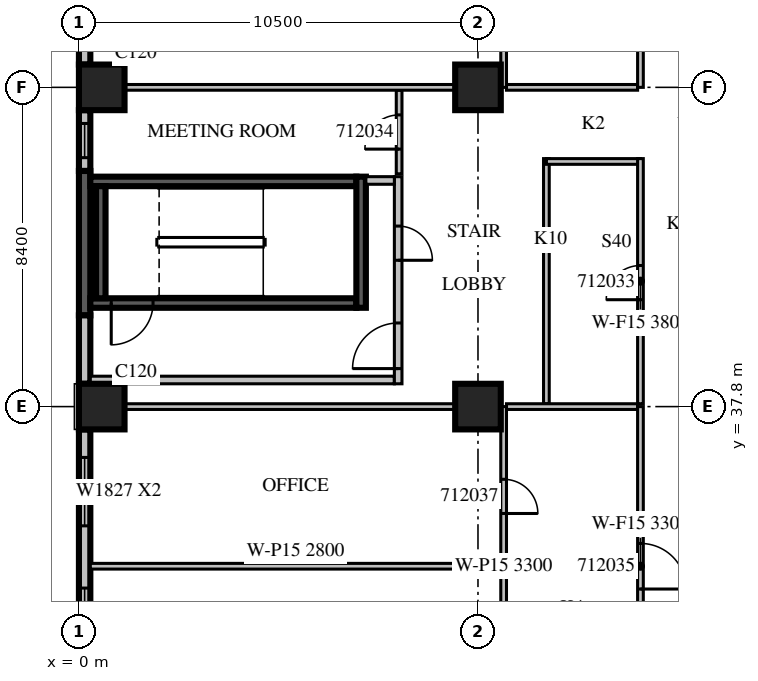
"""IFC4 building model, lengths in metres.
Left out: names, types, materials, properties, quantities, classifications, styles, units other than length and angle.
Written with IfcOpenShell. Run it as: python <this file> out.ifc"""

import sys

from ifc_helpers import new_model, si_unit, direction, frame, frame_2d, origin, origin_2d, place, context, subcontext, project, spatial, rectangle, extrude, source, transform, mapped, element, fill, save


model = new_model("IFC4")
c1 = context("Model", 3, precision=1e-05, world=origin(), true_north=direction((0.0, 1.0)))
c2 = subcontext(c1, "Body", "Model", "MODEL_VIEW")
j1 = project(units=[si_unit("LENGTHUNIT", "METRE"), si_unit("PLANEANGLEUNIT", "RADIAN")], contexts=[c1])
p1 = place(None, origin())
s1 = spatial("IfcSite", under=j1, at=p1, CompositionType="ELEMENT")
p2 = place(p1, origin())
s2 = spatial("IfcBuilding", under=s1, at=p2, CompositionType="ELEMENT")
p3 = place(p2, frame((0.0, 0.0, 61.5)))
s3 = spatial("IfcBuildingStorey", under=s2, at=p3, CompositionType="ELEMENT", Elevation=61.5)
m1 = source(origin(), c2, "Body", "SweptSolid", [
    extrude(rectangle(XDim=1.2, YDim=1.2, at=origin_2d()), origin(), (0.0, 0.0, 1.0), 4.2),
])
for number, where, z_axis, x_axis in (
    (1, (0.6, 37.8, 0.0), (0.0, 0.0, 1.0), (1.0, 0.0, 0.0)),
    (2, (10.5, 37.8, 0.0), (0.0, 0.0, 1.0), (1.0, 0.0, 0.0)),
    (3, (0.6, 46.2, 0.0), (0.0, 0.0, 1.0), (1.0, 0.0, 0.0)),
    (4, (10.5, 46.2, 0.0), (0.0, 0.0, 1.0), (1.0, 0.0, 0.0)),
):
    element("IfcColumn", number, at=place(p3, frame(where, z_axis=z_axis, x_axis=x_axis)), inside=s3, PredefinedType="COLUMN", context=c2, shape_type="MappedRepresentation", body=[
        mapped(m1, transform((0.0, 0.0, 0.0), scale=1.0)),
    ])
m2 = source(origin(), c2, "Body", "SweptSolid", [
    extrude(rectangle(XDim=4.68, YDim=0.3, at=frame_2d((2.34, 0.0))), origin(), (0.0, 0.0, 1.0), 3.8),
])
p4 = place(p3, frame((0.15, 51.48, 0.0), z_axis=(0.0, 0.0, 1.0), x_axis=(0.0, -1.0, 0.0)))
e5 = element("IfcWall", 5, at=p4, inside=s3, PredefinedType="STANDARD", context=c2, shape_type="MappedRepresentation", body=[
    mapped(m2, transform((0.0, 0.0, 0.0), scale=1.0)),
])
m3 = source(origin(), c2, "Body", "SweptSolid", [
    extrude(rectangle(XDim=1.6, YDim=0.3, at=frame_2d((0.8, 0.0))), origin(), (0.0, 0.0, 1.0), 3.8),
])
p5 = place(p3, frame((0.15, 45.6, 0.0), z_axis=(0.0, 0.0, 1.0), x_axis=(0.0, -1.0, 0.0)))
e6 = element("IfcWall", 6, at=p5, inside=s3, PredefinedType="STANDARD", context=c2, shape_type="MappedRepresentation", body=[
    mapped(m3, transform((0.0, 0.0, 0.0), scale=1.0)),
])
m4 = source(origin(), c2, "Body", "SweptSolid", [
    extrude(rectangle(XDim=0.9, YDim=2.7, at=frame_2d((0.45, 1.35))), frame((0.0, 0.16, 0.0), z_axis=(0.0, -1.0, 0.0), x_axis=(1.0, 0.0, 0.0)), (0.0, 0.0, 1.0), 0.32),
])
p6 = place(p5, frame((0.35, 0.0, 0.6)))
e7 = element("IfcOpeningElement", 7, at=p6, cuts=e6, PredefinedType="OPENING", context=c2, shape_type="MappedRepresentation", body=[
    mapped(m4, transform((0.0, 0.0, 0.0), scale=1.0)),
])
m5 = source(origin(), c2, "Body", "SweptSolid", [
    extrude(rectangle(XDim=3.8, YDim=0.3, at=frame_2d((1.9, 0.0))), origin(), (0.0, 0.0, 1.0), 3.8),
])
p7 = place(p3, frame((0.15, 44.0, 0.0), z_axis=(0.0, 0.0, 1.0), x_axis=(0.0, -1.0, 0.0)))
e8 = element("IfcWall", 8, at=p7, inside=s3, PredefinedType="SOLIDWALL", context=c2, shape_type="MappedRepresentation", body=[
    mapped(m5, transform((0.0, 0.0, 0.0), scale=1.0)),
])
m6 = source(origin(), c2, "Body", "SweptSolid", [
    extrude(rectangle(XDim=1.8, YDim=0.3, at=frame_2d((0.9, 0.0))), origin(), (0.0, 0.0, 1.0), 3.8),
])
p8 = place(p3, frame((0.15, 40.2, 0.0), z_axis=(0.0, 0.0, 1.0), x_axis=(0.0, -1.0, 0.0)))
e9 = element("IfcWall", 9, at=p8, inside=s3, PredefinedType="STANDARD", context=c2, shape_type="MappedRepresentation", body=[
    mapped(m6, transform((0.0, 0.0, 0.0), scale=1.0)),
])
m7 = source(origin(), c2, "Body", "SweptSolid", [
    extrude(rectangle(XDim=7.2, YDim=0.3, at=frame_2d((3.6, 0.0))), origin(), (0.0, 0.0, 1.0), 3.8),
])
p9 = place(p3, frame((0.15, 37.2, 0.0), z_axis=(0.0, 0.0, 1.0), x_axis=(0.0, -1.0, 0.0)))
e10 = element("IfcWall", 10, at=p9, inside=s3, PredefinedType="STANDARD", context=c2, shape_type="MappedRepresentation", body=[
    mapped(m7, transform((0.0, 0.0, 0.0), scale=1.0)),
])
m8 = source(origin(), c2, "Body", "SweptSolid", [
    extrude(rectangle(XDim=1.8, YDim=2.7, at=frame_2d((0.9, 1.35))), frame((0.0, 0.16, 0.0), z_axis=(0.0, -1.0, 0.0), x_axis=(1.0, 0.0, 0.0)), (0.0, 0.0, 1.0), 0.32),
])
p10 = place(p9, frame((0.738, 0.0, 0.6)))
e11 = element("IfcOpeningElement", 11, at=p10, cuts=e10, PredefinedType="OPENING", context=c2, shape_type="MappedRepresentation", body=[
    mapped(m8, transform((0.0, 0.0, 0.0), scale=1.0)),
])
p11 = place(p9, frame((4.175, 0.0, 0.6)))
e12 = element("IfcOpeningElement", 12, at=p11, cuts=e10, PredefinedType="OPENING", context=c2, shape_type="MappedRepresentation", body=[
    mapped(m8, transform((0.0, 0.0, 0.0), scale=1.0)),
])
m9 = source(origin(), c2, "Body", "SweptSolid", [
    extrude(rectangle(XDim=7.0, YDim=0.25, at=frame_2d((3.5, 0.0))), origin(), (0.0, 0.0, 1.0), 3.8),
])
p12 = place(p3, frame((0.3, 40.525, 0.0), z_axis=(0.0, 0.0, 1.0), x_axis=(1.0, 0.0, 0.0)))
e13 = element("IfcWall", 13, at=p12, inside=s3, PredefinedType="SOLIDWALL", context=c2, shape_type="MappedRepresentation", body=[
    mapped(m9, transform((0.0, 0.0, 0.0), scale=1.0)),
])
m10 = source(origin(), c2, "Body", "SweptSolid", [
    extrude(rectangle(XDim=1.1, YDim=2.1, at=frame_2d((0.55, 1.05))), frame((0.0, 0.135, 0.0), z_axis=(0.0, -1.0, 0.0), x_axis=(1.0, 0.0, 0.0)), (0.0, 0.0, 1.0), 0.27),
])
p13 = place(p12, frame((0.55, 0.0, 0.0)))
e14 = element("IfcOpeningElement", 14, at=p13, cuts=e13, PredefinedType="OPENING", context=c2, shape_type="MappedRepresentation", body=[
    mapped(m10, transform((0.0, 0.0, 0.0), scale=1.0)),
])
p14 = place(p3, frame((0.3, 43.725, 0.0), z_axis=(0.0, 0.0, 1.0), x_axis=(1.0, 0.0, 0.0)))
e15 = element("IfcWall", 15, at=p14, inside=s3, PredefinedType="SOLIDWALL", context=c2, shape_type="MappedRepresentation", body=[
    mapped(m9, transform((0.0, 0.0, 0.0), scale=1.0)),
])
m11 = source(origin(), c2, "Body", "SweptSolid", [
    extrude(rectangle(XDim=3.45, YDim=0.25, at=frame_2d((1.725, 0.0))), origin(), (0.0, 0.0, 1.0), 3.8),
])
p15 = place(p3, frame((7.425, 40.4, 0.0), z_axis=(0.0, 0.0, 1.0), x_axis=(0.0, 1.0, 0.0)))
e16 = element("IfcWall", 16, at=p15, inside=s3, PredefinedType="SOLIDWALL", context=c2, shape_type="MappedRepresentation", body=[
    mapped(m11, transform((0.0, 0.0, 0.0), scale=1.0)),
])
m12 = source(origin(), c2, "Body", "SweptSolid", [
    extrude(rectangle(XDim=2.95, YDim=0.25, at=frame_2d((1.475, 0.0))), origin(), (0.0, 0.0, 1.0), 3.8),
])
p16 = place(p3, frame((0.575, 40.65, 0.0), z_axis=(0.0, 0.0, 1.0), x_axis=(0.0, 1.0, 0.0)))
e17 = element("IfcWall", 17, at=p16, inside=s3, PredefinedType="SOLIDWALL", context=c2, shape_type="MappedRepresentation", body=[
    mapped(m12, transform((0.0, 0.0, 0.0), scale=1.0)),
])
m13 = source(origin(), c2, "Body", "SweptSolid", [
    extrude(rectangle(XDim=8.0, YDim=0.2, at=frame_2d((4.0, 0.0))), origin(), (0.0, 0.0, 1.0), 3.8),
])
p17 = place(p3, frame((0.3, 38.5, 0.0), z_axis=(0.0, 0.0, 1.0), x_axis=(1.0, 0.0, 0.0)))
e18 = element("IfcWall", 18, at=p17, inside=s3, PredefinedType="PARTITIONING", context=c2, shape_type="MappedRepresentation", body=[
    mapped(m13, transform((0.0, 0.0, 0.0), scale=1.0)),
])
m14 = source(origin(), c2, "Body", "SweptSolid", [
    extrude(rectangle(XDim=5.45, YDim=0.2, at=frame_2d((2.725, 0.0))), origin(), (0.0, 0.0, 1.0), 3.8),
])
p18 = place(p3, frame((8.4, 38.4, 0.0), z_axis=(0.0, 0.0, 1.0), x_axis=(0.0, 1.0, 0.0)))
e19 = element("IfcWall", 19, at=p18, inside=s3, PredefinedType="PARTITIONING", context=c2, shape_type="MappedRepresentation", body=[
    mapped(m14, transform((0.0, 0.0, 0.0), scale=1.0)),
])
m15 = source(origin(), c2, "Body", "SweptSolid", [
    extrude(rectangle(XDim=1.2, YDim=2.1, at=frame_2d((0.6, 1.05))), frame((0.0, 0.11, 0.0), z_axis=(0.0, -1.0, 0.0), x_axis=(1.0, 0.0, 0.0)), (0.0, 0.0, 1.0), 0.22),
])
p19 = place(p18, frame((0.4, 0.0, 0.0)))
e20 = element("IfcOpeningElement", 20, at=p19, cuts=e19, PredefinedType="OPENING", context=c2, shape_type="MappedRepresentation", body=[
    mapped(m15, transform((0.0, 0.0, 0.0), scale=1.0)),
])
m16 = source(origin(), c2, "Body", "SweptSolid", [
    extrude(rectangle(XDim=0.9, YDim=2.1, at=frame_2d((0.45, 1.05))), frame((0.0, 0.11, 0.0), z_axis=(0.0, -1.0, 0.0), x_axis=(1.0, 0.0, 0.0)), (0.0, 0.0, 1.0), 0.22),
])
p20 = place(p18, frame((3.25, 0.0, 0.0)))
e21 = element("IfcOpeningElement", 21, at=p20, cuts=e19, PredefinedType="OPENING", context=c2, shape_type="MappedRepresentation", body=[
    mapped(m16, transform((0.0, 0.0, 0.0), scale=1.0)),
])
m17 = source(origin(), c2, "Body", "SweptSolid", [
    extrude(rectangle(XDim=0.75, YDim=0.2, at=frame_2d((0.375, 0.0))), origin(), (0.0, 0.0, 1.0), 3.8),
])
p21 = place(p3, frame((7.55, 43.75, 0.0), z_axis=(0.0, 0.0, 1.0), x_axis=(1.0, 0.0, 0.0)))
e22 = element("IfcWall", 22, at=p21, inside=s3, PredefinedType="PARTITIONING", context=c2, shape_type="MappedRepresentation", body=[
    mapped(m17, transform((0.0, 0.0, 0.0), scale=1.0)),
])
m18 = source(origin(), c2, "Body", "SweptSolid", [
    extrude(rectangle(XDim=6.45, YDim=0.15, at=frame_2d((3.225, 0.0))), origin(), (0.0, 0.0, 1.0), 3.8),
])
p22 = place(p3, frame((12.3, 44.325, 0.0), z_axis=(0.0, 0.0, 1.0), x_axis=(0.0, -1.0, 0.0)))
e23 = element("IfcWall", 23, at=p22, inside=s3, PredefinedType="PARTITIONING", context=c2, shape_type="MappedRepresentation", body=[
    mapped(m18, transform((0.0, 0.0, 0.0), scale=1.0)),
])
m19 = source(origin(), c2, "Body", "SweptSolid", [
    extrude(rectangle(XDim=2.475, YDim=0.15, at=frame_2d((1.238, 0.0))), origin(), (0.0, 0.0, 1.0), 3.8),
])
p23 = place(p3, frame((14.775, 44.25, 0.0), z_axis=(0.0, 0.0, 1.0), x_axis=(-1.0, 0.0, 0.0)))
e24 = element("IfcWall", 24, at=p23, inside=s3, PredefinedType="PARTITIONING", context=c2, shape_type="MappedRepresentation", body=[
    mapped(m19, transform((0.0, 0.0, 0.0), scale=1.0)),
])
p24 = place(p3, frame((14.775, 37.875, 0.0), z_axis=(0.0, 0.0, 1.0), x_axis=(0.0, 1.0, 0.0)))
e25 = element("IfcWall", 25, at=p24, inside=s3, PredefinedType="PARTITIONING", context=c2, shape_type="MappedRepresentation", body=[
    mapped(m18, transform((0.0, 0.0, 0.0), scale=1.0)),
])
m20 = source(origin(), c2, "Body", "SweptSolid", [
    extrude(rectangle(XDim=0.9, YDim=2.1, at=frame_2d((0.45, 1.05))), frame((0.0, 0.085, 0.0), z_axis=(0.0, -1.0, 0.0), x_axis=(1.0, 0.0, 0.0)), (0.0, 0.0, 1.0), 0.17),
])
p25 = place(p24, frame((2.737, 0.0, 0.0)))
e26 = element("IfcOpeningElement", 26, at=p25, cuts=e25, PredefinedType="OPENING", context=c2, shape_type="MappedRepresentation", body=[
    mapped(m20, transform((0.0, 0.0, 0.0), scale=1.0)),
])
m21 = source(origin(), c2, "Body", "SweptSolid", [
    extrude(rectangle(XDim=2.2, YDim=0.15, at=frame_2d((1.1, 0.0))), origin(), (0.0, 0.0, 1.0), 3.8),
])
p26 = place(p3, frame((8.425, 43.925, 0.0), z_axis=(0.0, 0.0, 1.0), x_axis=(0.0, 1.0, 0.0)))
e27 = element("IfcWall", 27, at=p26, inside=s3, PredefinedType="PARTITIONING", context=c2, shape_type="MappedRepresentation", body=[
    mapped(m21, transform((0.0, 0.0, 0.0), scale=1.0)),
])
p27 = place(p26, frame((0.65, 0.0, 0.0)))
e28 = element("IfcOpeningElement", 28, at=p27, cuts=e27, PredefinedType="OPENING", context=c2, shape_type="MappedRepresentation", body=[
    mapped(m20, transform((0.0, 0.0, 0.0), scale=1.0)),
])
p28 = place(p3, frame((11.1, 33.6, 0.0), z_axis=(0.0, 0.0, 1.0), x_axis=(-1.0, 0.0, 0.0)))
e29 = element("IfcWall", 29, at=p28, inside=s3, PredefinedType="PARTITIONING", context=c2, shape_type="SweptSolid", body=[
    extrude(rectangle(XDim=10.8, YDim=0.15, at=frame_2d((5.4, 0.0))), origin(), (0.0, 0.0, 1.0), 2.8),
])
m22 = source(origin(), c2, "Body", "SweptSolid", [
    extrude(rectangle(XDim=8.702, YDim=0.15, at=frame_2d((4.351, 0.0))), origin(), (0.0, 0.0, 1.0), 3.8),
])
p29 = place(p3, frame((9.901, 37.8, 0.0), z_axis=(0.0, 0.0, 1.0), x_axis=(-1.0, 0.0, 0.0)))
e30 = element("IfcWall", 30, at=p29, inside=s3, PredefinedType="PARTITIONING", context=c2, shape_type="MappedRepresentation", body=[
    mapped(m22, transform((0.0, 0.0, 0.0), scale=1.0)),
])
m23 = source(origin(), c2, "Body", "SweptSolid", [
    extrude(rectangle(XDim=3.45, YDim=0.15, at=frame_2d((1.725, 0.0))), origin(), (0.0, 0.0, 1.0), 3.8),
])
p30 = place(p3, frame((14.7, 37.8, 0.0), z_axis=(0.0, 0.0, 1.0), x_axis=(-1.0, 0.0, 0.0)))
e31 = element("IfcWall", 31, at=p30, inside=s3, PredefinedType="PARTITIONING", context=c2, shape_type="MappedRepresentation", body=[
    mapped(m23, transform((0.0, 0.0, 0.0), scale=1.0)),
])
m24 = source(origin(), c2, "Body", "SweptSolid", [
    extrude(rectangle(XDim=8.4, YDim=0.15, at=frame_2d((4.2, 0.0))), origin(), (0.0, 0.0, 1.0), 3.3),
])
p31 = place(p3, frame((11.175, 29.4, 0.0), z_axis=(0.0, 0.0, 1.0), x_axis=(0.0, 1.0, 0.0)))
e32 = element("IfcWall", 32, at=p31, inside=s3, PredefinedType="PARTITIONING", context=c2, shape_type="MappedRepresentation", body=[
    mapped(m24, transform((0.0, 0.0, 0.0), scale=1.0)),
])
p32 = place(p31, frame((1.962, 0.0, 0.0)))
e33 = element("IfcOpeningElement", 33, at=p32, cuts=e32, PredefinedType="OPENING", context=c2, shape_type="MappedRepresentation", body=[
    mapped(m20, transform((0.0, 0.0, 0.0), scale=1.0)),
])
p33 = place(p31, frame((5.588, 0.0, 0.0)))
e34 = element("IfcOpeningElement", 34, at=p33, cuts=e32, PredefinedType="OPENING", context=c2, shape_type="MappedRepresentation", body=[
    mapped(m20, transform((0.0, 0.0, 0.0), scale=1.0)),
])
p34 = place(p3, frame((9.901, 46.2, 0.0), z_axis=(0.0, 0.0, 1.0), x_axis=(-1.0, 0.0, 0.0)))
e35 = element("IfcWall", 35, at=p34, inside=s3, PredefinedType="PARTITIONING", context=c2, shape_type="MappedRepresentation", body=[
    mapped(m22, transform((0.0, 0.0, 0.0), scale=1.0)),
])
p35 = place(p3, frame((14.7, 46.2, 0.0), z_axis=(0.0, 0.0, 1.0), x_axis=(-1.0, 0.0, 0.0)))
e36 = element("IfcWall", 36, at=p35, inside=s3, PredefinedType="PARTITIONING", context=c2, shape_type="MappedRepresentation", body=[
    mapped(m23, transform((0.0, 0.0, 0.0), scale=1.0)),
])
m25 = source(origin(), c2, "Body", "SweptSolid", [
    extrude(rectangle(XDim=19.02, YDim=0.15, at=frame_2d((9.51, 0.0))), origin(), (0.0, 0.0, 1.0), 3.8),
])
p36 = place(p3, frame((11.175, 46.2, 0.0), z_axis=(0.0, 0.0, 1.0), x_axis=(0.0, 1.0, 0.0)))
e37 = element("IfcWall", 37, at=p36, inside=s3, PredefinedType="PARTITIONING", context=c2, shape_type="MappedRepresentation", body=[
    mapped(m25, transform((0.0, 0.0, 0.0), scale=1.0)),
])
p37 = place(p36, frame((2.487, 0.0, 0.0)))
e38 = element("IfcOpeningElement", 38, at=p37, cuts=e37, PredefinedType="OPENING", context=c2, shape_type="MappedRepresentation", body=[
    mapped(m20, transform((0.0, 0.0, 0.0), scale=1.0)),
])
p38 = place(p36, frame((8.367, 0.0, 0.0)))
e39 = element("IfcOpeningElement", 39, at=p38, cuts=e37, PredefinedType="OPENING", context=c2, shape_type="MappedRepresentation", body=[
    mapped(m20, transform((0.0, 0.0, 0.0), scale=1.0)),
])
p39 = place(p36, frame((16.094, 0.0, 0.0)))
e40 = element("IfcOpeningElement", 40, at=p39, cuts=e37, PredefinedType="OPENING", context=c2, shape_type="MappedRepresentation", body=[
    mapped(m20, transform((0.0, 0.0, 0.0), scale=1.0)),
])
p40 = place(p3, frame((14.775, 29.4, 0.0), z_axis=(0.0, 0.0, 1.0), x_axis=(0.0, 1.0, 0.0)))
e41 = element("IfcWall", 41, at=p40, inside=s3, PredefinedType="PARTITIONING", context=c2, shape_type="MappedRepresentation", body=[
    mapped(m24, transform((0.0, 0.0, 0.0), scale=1.0)),
])
m26 = source(origin(), c2, "Body", "SweptSolid", [
    extrude(rectangle(XDim=1.2, YDim=2.1, at=frame_2d((0.6, 1.05))), frame((0.0, 0.085, 0.0), z_axis=(0.0, -1.0, 0.0), x_axis=(1.0, 0.0, 0.0)), (0.0, 0.0, 1.0), 0.17),
])
p41 = place(p40, frame((3.6, 0.0, 0.0)))
e42 = element("IfcOpeningElement", 42, at=p41, cuts=e41, PredefinedType="OPENING", context=c2, shape_type="MappedRepresentation", body=[
    mapped(m26, transform((0.0, 0.0, 0.0), scale=1.0)),
])
p42 = place(p3, frame((14.775, 46.2, 0.0), z_axis=(0.0, 0.0, 1.0), x_axis=(0.0, 1.0, 0.0)))
e43 = element("IfcWall", 43, at=p42, inside=s3, PredefinedType="PARTITIONING", context=c2, shape_type="MappedRepresentation", body=[
    mapped(m25, transform((0.0, 0.0, 0.0), scale=1.0)),
])
p43 = place(p42, frame((5.28, 0.0, 0.0)))
e44 = element("IfcOpeningElement", 44, at=p43, cuts=e43, PredefinedType="OPENING", context=c2, shape_type="MappedRepresentation", body=[
    mapped(m26, transform((0.0, 0.0, 0.0), scale=1.0)),
])
m27 = source(origin(), c2, "Body", "SweptSolid", [
    extrude(rectangle(XDim=1.1, YDim=2.1, at=frame_2d((0.55, 1.05))), frame((0.0, 0.085, 0.0), z_axis=(0.0, -1.0, 0.0), x_axis=(1.0, 0.0, 0.0)), (0.0, 0.0, 1.0), 0.17),
])
p44 = place(p42, frame((16.944, 0.0, 0.0)))
e45 = element("IfcOpeningElement", 45, at=p44, cuts=e43, PredefinedType="OPENING", context=c2, shape_type="MappedRepresentation", body=[
    mapped(m27, transform((0.0, 0.0, 0.0), scale=1.0)),
])
p45 = place(p42, frame((13.377, 0.0, 0.0)))
e46 = element("IfcOpeningElement", 46, at=p45, cuts=e43, PredefinedType="OPENING", context=c2, shape_type="MappedRepresentation", body=[
    mapped(m20, transform((0.0, 0.0, 0.0), scale=1.0)),
])
m28 = source(origin(), c2, "Body", "SweptSolid", [
    extrude(rectangle(XDim=0.9, YDim=2.7, at=frame_2d((0.45, 1.35))), frame((0.0, 0.03, 0.0), z_axis=(0.0, -1.0, 0.0), x_axis=(1.0, 0.0, 0.0)), (0.0, 0.0, 1.0), 0.06),
])
p46 = place(p6, origin())
e47 = element("IfcWindow", 47, at=p46, inside=s3, PartitioningType="SINGLE_PANEL", PredefinedType="WINDOW", context=c2, shape_type="MappedRepresentation", body=[
    mapped(m28, transform((0.0, 0.0, 0.0), scale=1.0)),
])
fill(e7, e47)
m29 = source(origin(), c2, "Body", "SweptSolid", [
    extrude(rectangle(XDim=1.8, YDim=2.7, at=frame_2d((0.9, 1.35))), frame((0.0, 0.03, 0.0), z_axis=(0.0, -1.0, 0.0), x_axis=(1.0, 0.0, 0.0)), (0.0, 0.0, 1.0), 0.06),
])
p47 = place(p10, origin())
e48 = element("IfcWindow", 48, at=p47, inside=s3, PartitioningType="SINGLE_PANEL", PredefinedType="WINDOW", context=c2, shape_type="MappedRepresentation", body=[
    mapped(m29, transform((0.0, 0.0, 0.0), scale=1.0)),
])
fill(e11, e48)
p48 = place(p11, origin())
e49 = element("IfcWindow", 49, at=p48, inside=s3, PartitioningType="SINGLE_PANEL", PredefinedType="WINDOW", context=c2, shape_type="MappedRepresentation", body=[
    mapped(m29, transform((0.0, 0.0, 0.0), scale=1.0)),
])
fill(e12, e49)
m30 = source(origin(), c2, "Body", "SweptSolid", [
    extrude(rectangle(XDim=1.1, YDim=2.1, at=frame_2d((0.55, 1.05))), frame((0.0, 0.025, 0.0), z_axis=(0.0, -1.0, 0.0), x_axis=(1.0, 0.0, 0.0)), (0.0, 0.0, 1.0), 0.05),
])
p49 = place(p13, origin())
e50 = element("IfcDoor", 50, at=p49, inside=s3, OperationType="SINGLE_SWING_RIGHT", PredefinedType="DOOR", context=c2, shape_type="MappedRepresentation", body=[
    mapped(m30, transform((0.0, 0.0, 0.0), scale=1.0)),
])
fill(e14, e50)
m31 = source(origin(), c2, "Body", "SweptSolid", [
    extrude(rectangle(XDim=1.2, YDim=2.1, at=frame_2d((0.6, 1.05))), frame((0.0, 0.025, 0.0), z_axis=(0.0, -1.0, 0.0), x_axis=(1.0, 0.0, 0.0)), (0.0, 0.0, 1.0), 0.05),
])
p50 = place(p19, origin())
e51 = element("IfcDoor", 51, at=p50, inside=s3, OperationType="SINGLE_SWING_LEFT", PredefinedType="DOOR", context=c2, shape_type="MappedRepresentation", body=[
    mapped(m31, transform((0.0, 0.0, 0.0), scale=1.0)),
])
fill(e20, e51)
m32 = source(origin(), c2, "Body", "SweptSolid", [
    extrude(rectangle(XDim=0.9, YDim=2.1, at=frame_2d((0.45, 1.05))), frame((0.0, 0.025, 0.0), z_axis=(0.0, -1.0, 0.0), x_axis=(1.0, 0.0, 0.0)), (0.0, 0.0, 1.0), 0.05),
])
p51 = place(p20, origin())
e52 = element("IfcDoor", 52, at=p51, inside=s3, OperationType="SINGLE_SWING_RIGHT", PredefinedType="DOOR", context=c2, shape_type="MappedRepresentation", body=[
    mapped(m32, transform((0.0, 0.0, 0.0), scale=1.0)),
])
fill(e21, e52)
p52 = place(p25, origin())
e53 = element("IfcDoor", 53, at=p52, inside=s3, OperationType="SINGLE_SWING_LEFT", PredefinedType="DOOR", context=c2, shape_type="MappedRepresentation", body=[
    mapped(m32, transform((0.0, 0.0, 0.0), scale=1.0)),
])
fill(e26, e53)
p53 = place(p27, origin())
e54 = element("IfcDoor", 54, at=p53, inside=s3, OperationType="SINGLE_SWING_LEFT", PredefinedType="DOOR", context=c2, shape_type="MappedRepresentation", body=[
    mapped(m32, transform((0.0, 0.0, 0.0), scale=1.0)),
])
fill(e28, e54)
p54 = place(p41, origin())
e55 = element("IfcDoor", 55, at=p54, inside=s3, OperationType="SINGLE_SWING_RIGHT", PredefinedType="DOOR", context=c2, shape_type="MappedRepresentation", body=[
    mapped(m31, transform((0.0, 0.0, 0.0), scale=1.0)),
])
fill(e42, e55)
p55 = place(p33, origin())
e56 = element("IfcDoor", 56, at=p55, inside=s3, OperationType="SINGLE_SWING_RIGHT", PredefinedType="DOOR", context=c2, shape_type="MappedRepresentation", body=[
    mapped(m32, transform((0.0, 0.0, 0.0), scale=1.0)),
])
fill(e34, e56)
save(model, sys.argv[1])
